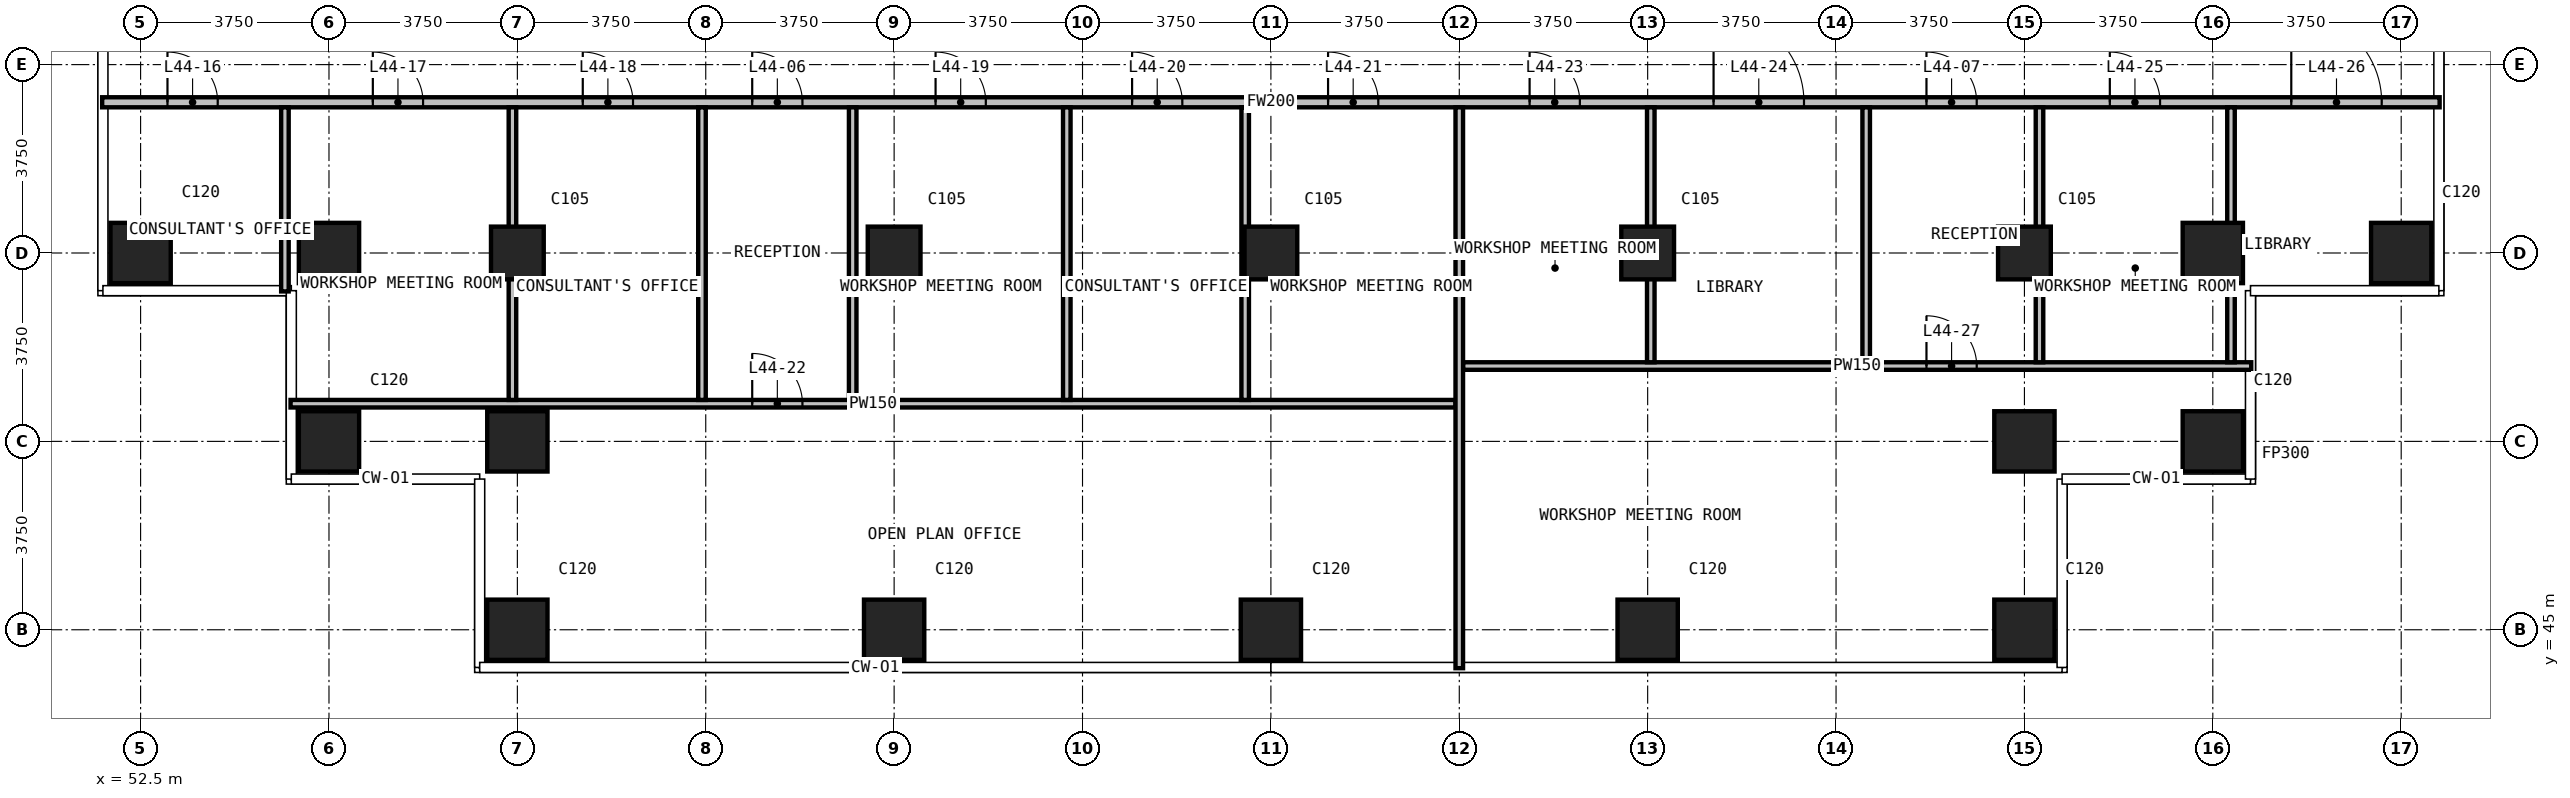
"""IFC4 building model, lengths in metres.
Left out: names, types, materials, properties, quantities, classifications, styles, units other than length and angle.
Written with IfcOpenShell. Run it as: python <this file> out.ifc"""

import sys

from ifc_helpers import new_model, si_unit, direction, frame, frame_2d, origin, origin_2d, place, context, subcontext, project, spatial, rectangle, extrude, element, fill, save


model = new_model("IFC4")
c1 = context("Model", 3, precision=1e-05, world=origin(), true_north=direction((0.0, 1.0)))
c2 = subcontext(c1, "Body", "Model", "MODEL_VIEW")
j1 = project(units=[si_unit("LENGTHUNIT", "METRE"), si_unit("PLANEANGLEUNIT", "RADIAN")], contexts=[c1])
p1 = place(None, origin())
s1 = spatial("IfcSite", under=j1, at=p1, CompositionType="ELEMENT")
p2 = place(p1, origin())
s2 = spatial("IfcBuilding", under=s1, at=p2, CompositionType="ELEMENT")
p3 = place(p2, frame((0.0, 0.0, 172.9)))
s3 = spatial("IfcBuildingStorey", under=s2, at=p3, CompositionType="ELEMENT", Elevation=172.9)
for number, where, z_axis, x_axis in (
    (1, (52.5, 52.5, 0.0), (0.0, 0.0, 1.0), (1.0, 0.0, 0.0)),
    (2, (56.25, 48.75, 0.0), (0.0, 0.0, 1.0), (1.0, 0.0, 0.0)),
    (3, (56.25, 52.5, 0.0), (0.0, 0.0, 1.0), (1.0, 0.0, 0.0)),
    (4, (60.0, 45.0, 0.0), (0.0, 0.0, 1.0), (1.0, 0.0, 0.0)),
    (5, (60.0, 48.75, 0.0), (0.0, 0.0, 1.0), (1.0, 0.0, 0.0)),
):
    element("IfcColumn", number, at=place(p3, frame(where, z_axis=z_axis, x_axis=x_axis)), inside=s3, PredefinedType="COLUMN", context=c2, shape_type="SweptSolid", body=[
        extrude(rectangle(XDim=1.2, YDim=1.2, at=origin_2d()), origin(), (0.0, 0.0, 1.0), 3.6),
    ])
p4 = place(p3, frame((60.0, 52.5, 0.0), z_axis=(0.0, 0.0, 1.0), x_axis=(1.0, 0.0, 0.0)))
e6 = element("IfcColumn", 6, at=p4, inside=s3, PredefinedType="COLUMN", context=c2, shape_type="SweptSolid", body=[
    extrude(rectangle(XDim=1.05, YDim=1.05, at=origin_2d()), origin(), (0.0, 0.0, 1.0), 3.6),
])
p5 = place(p3, frame((67.5, 45.0, 0.0), z_axis=(0.0, 0.0, 1.0), x_axis=(1.0, 0.0, 0.0)))
e7 = element("IfcColumn", 7, at=p5, inside=s3, PredefinedType="COLUMN", context=c2, shape_type="SweptSolid", body=[
    extrude(rectangle(XDim=1.2, YDim=1.2, at=origin_2d()), origin(), (0.0, 0.0, 1.0), 3.6),
])
p6 = place(p3, frame((67.5, 52.5, 0.0), z_axis=(0.0, 0.0, 1.0), x_axis=(1.0, 0.0, 0.0)))
e8 = element("IfcColumn", 8, at=p6, inside=s3, PredefinedType="COLUMN", context=c2, shape_type="SweptSolid", body=[
    extrude(rectangle(XDim=1.05, YDim=1.05, at=origin_2d()), origin(), (0.0, 0.0, 1.0), 3.6),
])
p7 = place(p3, frame((75.0, 45.0, 0.0), z_axis=(0.0, 0.0, 1.0), x_axis=(1.0, 0.0, 0.0)))
e9 = element("IfcColumn", 9, at=p7, inside=s3, PredefinedType="COLUMN", context=c2, shape_type="SweptSolid", body=[
    extrude(rectangle(XDim=1.2, YDim=1.2, at=origin_2d()), origin(), (0.0, 0.0, 1.0), 3.6),
])
p8 = place(p3, frame((75.0, 52.5, 0.0), z_axis=(0.0, 0.0, 1.0), x_axis=(1.0, 0.0, 0.0)))
e10 = element("IfcColumn", 10, at=p8, inside=s3, PredefinedType="COLUMN", context=c2, shape_type="SweptSolid", body=[
    extrude(rectangle(XDim=1.05, YDim=1.05, at=origin_2d()), origin(), (0.0, 0.0, 1.0), 3.6),
])
p9 = place(p3, frame((82.5, 45.0, 0.0), z_axis=(0.0, 0.0, 1.0), x_axis=(1.0, 0.0, 0.0)))
e11 = element("IfcColumn", 11, at=p9, inside=s3, PredefinedType="COLUMN", context=c2, shape_type="SweptSolid", body=[
    extrude(rectangle(XDim=1.2, YDim=1.2, at=origin_2d()), origin(), (0.0, 0.0, 1.0), 3.6),
])
p10 = place(p3, frame((82.5, 52.5, 0.0), z_axis=(0.0, 0.0, 1.0), x_axis=(1.0, 0.0, 0.0)))
e12 = element("IfcColumn", 12, at=p10, inside=s3, PredefinedType="COLUMN", context=c2, shape_type="SweptSolid", body=[
    extrude(rectangle(XDim=1.05, YDim=1.05, at=origin_2d()), origin(), (0.0, 0.0, 1.0), 3.6),
])
for number, where, z_axis, x_axis in (
    (13, (90.0, 45.0, 0.0), (0.0, 0.0, 1.0), (1.0, 0.0, 0.0)),
    (14, (90.0, 48.75, 0.0), (0.0, 0.0, 1.0), (1.0, 0.0, 0.0)),
):
    element("IfcColumn", number, at=place(p3, frame(where, z_axis=z_axis, x_axis=x_axis)), inside=s3, PredefinedType="COLUMN", context=c2, shape_type="SweptSolid", body=[
        extrude(rectangle(XDim=1.2, YDim=1.2, at=origin_2d()), origin(), (0.0, 0.0, 1.0), 3.6),
    ])
p11 = place(p3, frame((90.0, 52.5, 0.0), z_axis=(0.0, 0.0, 1.0), x_axis=(1.0, 0.0, 0.0)))
e15 = element("IfcColumn", 15, at=p11, inside=s3, PredefinedType="COLUMN", context=c2, shape_type="SweptSolid", body=[
    extrude(rectangle(XDim=1.05, YDim=1.05, at=origin_2d()), origin(), (0.0, 0.0, 1.0), 3.6),
])
for number, where, z_axis, x_axis in (
    (16, (93.75, 48.75, 0.0), (0.0, 0.0, 1.0), (1.0, 0.0, 0.0)),
    (17, (93.75, 52.5, 0.0), (0.0, 0.0, 1.0), (1.0, 0.0, 0.0)),
    (18, (97.5, 52.5, 0.0), (0.0, 0.0, 1.0), (1.0, 0.0, 0.0)),
):
    element("IfcColumn", number, at=place(p3, frame(where, z_axis=z_axis, x_axis=x_axis)), inside=s3, PredefinedType="COLUMN", context=c2, shape_type="SweptSolid", body=[
        extrude(rectangle(XDim=1.2, YDim=1.2, at=origin_2d()), origin(), (0.0, 0.0, 1.0), 3.6),
    ])
p12 = place(p3, frame((51.735, 55.5, 0.0), z_axis=(0.0, 0.0, 1.0), x_axis=(1.0, 0.0, 0.0)))
e19 = element("IfcWall", 19, at=p12, inside=s3, PredefinedType="PARTITIONING", context=c2, shape_type="SweptSolid", body=[
    extrude(rectangle(XDim=46.53, YDim=0.2, at=frame_2d((23.265, 0.0))), origin(), (0.0, 0.0, 1.0), 3.3),
])
p13 = place(p12, frame((12.94, 0.0, 0.0)))
e20 = element("IfcOpeningElement", 20, at=p13, cuts=e19, PredefinedType="OPENING", context=c2, shape_type="SweptSolid", body=[
    extrude(rectangle(XDim=1.0, YDim=2.2, at=frame_2d((0.5, 1.1))), frame((0.0, 0.11, 0.0), z_axis=(0.0, -1.0, 0.0), x_axis=(1.0, 0.0, 0.0)), (0.0, 0.0, 1.0), 0.22),
])
p14 = place(p12, frame((36.315, 0.0, 0.0)))
e21 = element("IfcOpeningElement", 21, at=p14, cuts=e19, PredefinedType="OPENING", context=c2, shape_type="SweptSolid", body=[
    extrude(rectangle(XDim=1.0, YDim=2.2, at=frame_2d((0.5, 1.1))), frame((0.0, 0.11, 0.0), z_axis=(0.0, -1.0, 0.0), x_axis=(1.0, 0.0, 0.0)), (0.0, 0.0, 1.0), 0.22),
])
p15 = place(p12, frame((1.3, 0.0, 0.0)))
e22 = element("IfcOpeningElement", 22, at=p15, cuts=e19, PredefinedType="OPENING", context=c2, shape_type="SweptSolid", body=[
    extrude(rectangle(XDim=1.0, YDim=2.2, at=frame_2d((0.5, 1.1))), frame((0.0, 0.11, 0.0), z_axis=(0.0, -1.0, 0.0), x_axis=(1.0, 0.0, 0.0)), (0.0, 0.0, 1.0), 0.22),
])
p16 = place(p12, frame((5.388, 0.0, 0.0)))
e23 = element("IfcOpeningElement", 23, at=p16, cuts=e19, PredefinedType="OPENING", context=c2, shape_type="SweptSolid", body=[
    extrude(rectangle(XDim=1.0, YDim=2.2, at=frame_2d((0.5, 1.1))), frame((0.0, 0.11, 0.0), z_axis=(0.0, -1.0, 0.0), x_axis=(1.0, 0.0, 0.0)), (0.0, 0.0, 1.0), 0.22),
])
p17 = place(p12, frame((9.567, 0.0, 0.0)))
e24 = element("IfcOpeningElement", 24, at=p17, cuts=e19, PredefinedType="OPENING", context=c2, shape_type="SweptSolid", body=[
    extrude(rectangle(XDim=1.0, YDim=2.2, at=frame_2d((0.5, 1.1))), frame((0.0, 0.11, 0.0), z_axis=(0.0, -1.0, 0.0), x_axis=(1.0, 0.0, 0.0)), (0.0, 0.0, 1.0), 0.22),
])
p18 = place(p12, frame((16.59, 0.0, 0.0)))
e25 = element("IfcOpeningElement", 25, at=p18, cuts=e19, PredefinedType="OPENING", context=c2, shape_type="SweptSolid", body=[
    extrude(rectangle(XDim=1.0, YDim=2.2, at=frame_2d((0.5, 1.1))), frame((0.0, 0.11, 0.0), z_axis=(0.0, -1.0, 0.0), x_axis=(1.0, 0.0, 0.0)), (0.0, 0.0, 1.0), 0.22),
])
p19 = place(p12, frame((20.502, 0.0, 0.0)))
e26 = element("IfcOpeningElement", 26, at=p19, cuts=e19, PredefinedType="OPENING", context=c2, shape_type="SweptSolid", body=[
    extrude(rectangle(XDim=1.0, YDim=2.2, at=frame_2d((0.5, 1.1))), frame((0.0, 0.11, 0.0), z_axis=(0.0, -1.0, 0.0), x_axis=(1.0, 0.0, 0.0)), (0.0, 0.0, 1.0), 0.22),
])
p20 = place(p12, frame((24.403, 0.0, 0.0)))
e27 = element("IfcOpeningElement", 27, at=p20, cuts=e19, PredefinedType="OPENING", context=c2, shape_type="SweptSolid", body=[
    extrude(rectangle(XDim=1.0, YDim=2.2, at=frame_2d((0.5, 1.1))), frame((0.0, 0.11, 0.0), z_axis=(0.0, -1.0, 0.0), x_axis=(1.0, 0.0, 0.0)), (0.0, 0.0, 1.0), 0.22),
])
p21 = place(p12, frame((28.415, 0.0, 0.0)))
e28 = element("IfcOpeningElement", 28, at=p21, cuts=e19, PredefinedType="OPENING", context=c2, shape_type="SweptSolid", body=[
    extrude(rectangle(XDim=1.0, YDim=2.2, at=frame_2d((0.5, 1.1))), frame((0.0, 0.11, 0.0), z_axis=(0.0, -1.0, 0.0), x_axis=(1.0, 0.0, 0.0)), (0.0, 0.0, 1.0), 0.22),
])
p22 = place(p12, frame((32.077, 0.0, 0.0)))
e29 = element("IfcOpeningElement", 29, at=p22, cuts=e19, PredefinedType="OPENING", context=c2, shape_type="SweptSolid", body=[
    extrude(rectangle(XDim=1.8, YDim=2.2, at=frame_2d((0.9, 1.1))), frame((0.0, 0.11, 0.0), z_axis=(0.0, -1.0, 0.0), x_axis=(1.0, 0.0, 0.0)), (0.0, 0.0, 1.0), 0.22),
])
p23 = place(p12, frame((39.965, 0.0, 0.0)))
e30 = element("IfcOpeningElement", 30, at=p23, cuts=e19, PredefinedType="OPENING", context=c2, shape_type="SweptSolid", body=[
    extrude(rectangle(XDim=1.0, YDim=2.2, at=frame_2d((0.5, 1.1))), frame((0.0, 0.11, 0.0), z_axis=(0.0, -1.0, 0.0), x_axis=(1.0, 0.0, 0.0)), (0.0, 0.0, 1.0), 0.22),
])
p24 = place(p12, frame((43.577, 0.0, 0.0)))
e31 = element("IfcOpeningElement", 31, at=p24, cuts=e19, PredefinedType="OPENING", context=c2, shape_type="SweptSolid", body=[
    extrude(rectangle(XDim=1.8, YDim=2.2, at=frame_2d((0.9, 1.1))), frame((0.0, 0.11, 0.0), z_axis=(0.0, -1.0, 0.0), x_axis=(1.0, 0.0, 0.0)), (0.0, 0.0, 1.0), 0.22),
])
p25 = place(p3, frame((55.485, 49.5, 0.0), z_axis=(0.0, 0.0, 1.0), x_axis=(1.0, 0.0, 0.0)))
e32 = element("IfcWall", 32, at=p25, inside=s3, PredefinedType="PARTITIONING", context=c2, shape_type="SweptSolid", body=[
    extrude(rectangle(XDim=23.19, YDim=0.15, at=frame_2d((11.595, 0.0))), origin(), (0.0, 0.0, 1.0), 3.3),
])
p26 = place(p25, frame((9.19, 0.0, 0.0)))
e33 = element("IfcOpeningElement", 33, at=p26, cuts=e32, PredefinedType="OPENING", context=c2, shape_type="SweptSolid", body=[
    extrude(rectangle(XDim=1.0, YDim=2.2, at=frame_2d((0.5, 1.1))), frame((0.0, 0.085, 0.0), z_axis=(0.0, -1.0, 0.0), x_axis=(1.0, 0.0, 0.0)), (0.0, 0.0, 1.0), 0.17),
])
p27 = place(p3, frame((78.825, 50.25, 0.0), z_axis=(0.0, 0.0, 1.0), x_axis=(1.0, 0.0, 0.0)))
e34 = element("IfcWall", 34, at=p27, inside=s3, PredefinedType="PARTITIONING", context=c2, shape_type="SweptSolid", body=[
    extrude(rectangle(XDim=15.69, YDim=0.15, at=frame_2d((7.845, 0.0))), origin(), (0.0, 0.0, 1.0), 3.3),
])
p28 = place(p27, frame((9.225, 0.0, 0.0)))
e35 = element("IfcOpeningElement", 35, at=p28, cuts=e34, PredefinedType="OPENING", context=c2, shape_type="SweptSolid", body=[
    extrude(rectangle(XDim=1.0, YDim=2.2, at=frame_2d((0.5, 1.1))), frame((0.0, 0.085, 0.0), z_axis=(0.0, -1.0, 0.0), x_axis=(1.0, 0.0, 0.0)), (0.0, 0.0, 1.0), 0.17),
])
p29 = place(p3, frame((55.373, 51.735, 0.0), z_axis=(0.0, 0.0, 1.0), x_axis=(0.0, 1.0, 0.0)))
e36 = element("IfcWall", 36, at=p29, inside=s3, PredefinedType="PARTITIONING", context=c2, shape_type="SweptSolid", body=[
    extrude(rectangle(XDim=3.665, YDim=0.15, at=frame_2d((1.833, 0.0))), origin(), (0.0, 0.0, 1.0), 3.3),
])
for number, where, z_axis, x_axis in (
    (37, (59.902, 49.575, 0.0), (0.0, 0.0, 1.0), (0.0, 1.0, 0.0)),
    (38, (63.675, 49.575, 0.0), (0.0, 0.0, 1.0), (0.0, 1.0, 0.0)),
    (39, (66.675, 49.575, 0.0), (0.0, 0.0, 1.0), (0.0, 1.0, 0.0)),
    (40, (70.937, 49.575, 0.0), (0.0, 0.0, 1.0), (0.0, 1.0, 0.0)),
    (41, (74.488, 49.575, 0.0), (0.0, 0.0, 1.0), (0.0, 1.0, 0.0)),
):
    element("IfcWall", number, at=place(p3, frame(where, z_axis=z_axis, x_axis=x_axis)), inside=s3, PredefinedType="PARTITIONING", context=c2, shape_type="SweptSolid", body=[
        extrude(rectangle(XDim=5.825, YDim=0.15, at=frame_2d((2.913, 0.0))), origin(), (0.0, 0.0, 1.0), 3.3),
    ])
p30 = place(p3, frame((78.75, 44.235, 0.0), z_axis=(0.0, 0.0, 1.0), x_axis=(0.0, 1.0, 0.0)))
e42 = element("IfcWall", 42, at=p30, inside=s3, PredefinedType="PARTITIONING", context=c2, shape_type="SweptSolid", body=[
    extrude(rectangle(XDim=11.165, YDim=0.15, at=frame_2d((5.583, 0.0))), origin(), (0.0, 0.0, 1.0), 3.3),
])
for number, where, z_axis, x_axis in (
    (43, (82.562, 50.325, 0.0), (0.0, 0.0, 1.0), (0.0, 1.0, 0.0)),
    (44, (86.85, 50.325, 0.0), (0.0, 0.0, 1.0), (0.0, 1.0, 0.0)),
    (45, (90.3, 50.325, 0.0), (0.0, 0.0, 1.0), (0.0, 1.0, 0.0)),
    (46, (94.112, 50.325, 0.0), (0.0, 0.0, 1.0), (0.0, 1.0, 0.0)),
):
    element("IfcWall", number, at=place(p3, frame(where, z_axis=z_axis, x_axis=x_axis)), inside=s3, PredefinedType="PARTITIONING", context=c2, shape_type="SweptSolid", body=[
        extrude(rectangle(XDim=5.075, YDim=0.15, at=frame_2d((2.538, 0.0))), origin(), (0.0, 0.0, 1.0), 3.3),
    ])
p31 = place(p13, origin())
e47 = element("IfcDoor", 47, at=p31, inside=s3, OperationType="SINGLE_SWING_RIGHT", PredefinedType="DOOR", context=c2, shape_type="SweptSolid", body=[
    extrude(rectangle(XDim=1.0, YDim=2.2, at=frame_2d((0.5, 1.1))), frame((0.0, 0.025, 0.0), z_axis=(0.0, -1.0, 0.0), x_axis=(1.0, 0.0, 0.0)), (0.0, 0.0, 1.0), 0.05),
])
fill(e20, e47)
p32 = place(p14, origin())
e48 = element("IfcDoor", 48, at=p32, inside=s3, OperationType="SINGLE_SWING_RIGHT", PredefinedType="DOOR", context=c2, shape_type="SweptSolid", body=[
    extrude(rectangle(XDim=1.0, YDim=2.2, at=frame_2d((0.5, 1.1))), frame((0.0, 0.025, 0.0), z_axis=(0.0, -1.0, 0.0), x_axis=(1.0, 0.0, 0.0)), (0.0, 0.0, 1.0), 0.05),
])
fill(e21, e48)
p33 = place(p15, origin())
e49 = element("IfcDoor", 49, at=p33, inside=s3, OperationType="SINGLE_SWING_LEFT", PredefinedType="DOOR", context=c2, shape_type="SweptSolid", body=[
    extrude(rectangle(XDim=1.0, YDim=2.2, at=frame_2d((0.5, 1.1))), frame((0.0, 0.025, 0.0), z_axis=(0.0, -1.0, 0.0), x_axis=(1.0, 0.0, 0.0)), (0.0, 0.0, 1.0), 0.05),
])
fill(e22, e49)
p34 = place(p16, origin())
e50 = element("IfcDoor", 50, at=p34, inside=s3, OperationType="SINGLE_SWING_LEFT", PredefinedType="DOOR", context=c2, shape_type="SweptSolid", body=[
    extrude(rectangle(XDim=1.0, YDim=2.2, at=frame_2d((0.5, 1.1))), frame((0.0, 0.025, 0.0), z_axis=(0.0, -1.0, 0.0), x_axis=(1.0, 0.0, 0.0)), (0.0, 0.0, 1.0), 0.05),
])
fill(e23, e50)
p35 = place(p17, origin())
e51 = element("IfcDoor", 51, at=p35, inside=s3, OperationType="SINGLE_SWING_RIGHT", PredefinedType="DOOR", context=c2, shape_type="SweptSolid", body=[
    extrude(rectangle(XDim=1.0, YDim=2.2, at=frame_2d((0.5, 1.1))), frame((0.0, 0.025, 0.0), z_axis=(0.0, -1.0, 0.0), x_axis=(1.0, 0.0, 0.0)), (0.0, 0.0, 1.0), 0.05),
])
fill(e24, e51)
p36 = place(p18, origin())
e52 = element("IfcDoor", 52, at=p36, inside=s3, OperationType="SINGLE_SWING_LEFT", PredefinedType="DOOR", context=c2, shape_type="SweptSolid", body=[
    extrude(rectangle(XDim=1.0, YDim=2.2, at=frame_2d((0.5, 1.1))), frame((0.0, 0.025, 0.0), z_axis=(0.0, -1.0, 0.0), x_axis=(1.0, 0.0, 0.0)), (0.0, 0.0, 1.0), 0.05),
])
fill(e25, e52)
p37 = place(p19, origin())
e53 = element("IfcDoor", 53, at=p37, inside=s3, OperationType="SINGLE_SWING_RIGHT", PredefinedType="DOOR", context=c2, shape_type="SweptSolid", body=[
    extrude(rectangle(XDim=1.0, YDim=2.2, at=frame_2d((0.5, 1.1))), frame((0.0, 0.025, 0.0), z_axis=(0.0, -1.0, 0.0), x_axis=(1.0, 0.0, 0.0)), (0.0, 0.0, 1.0), 0.05),
])
fill(e26, e53)
p38 = place(p20, origin())
e54 = element("IfcDoor", 54, at=p38, inside=s3, OperationType="SINGLE_SWING_LEFT", PredefinedType="DOOR", context=c2, shape_type="SweptSolid", body=[
    extrude(rectangle(XDim=1.0, YDim=2.2, at=frame_2d((0.5, 1.1))), frame((0.0, 0.025, 0.0), z_axis=(0.0, -1.0, 0.0), x_axis=(1.0, 0.0, 0.0)), (0.0, 0.0, 1.0), 0.05),
])
fill(e27, e54)
p39 = place(p26, origin())
e55 = element("IfcDoor", 55, at=p39, inside=s3, OperationType="SINGLE_SWING_LEFT", PredefinedType="DOOR", context=c2, shape_type="SweptSolid", body=[
    extrude(rectangle(XDim=1.0, YDim=2.2, at=frame_2d((0.5, 1.1))), frame((0.0, 0.025, 0.0), z_axis=(0.0, -1.0, 0.0), x_axis=(1.0, 0.0, 0.0)), (0.0, 0.0, 1.0), 0.05),
])
fill(e33, e55)
p40 = place(p21, origin())
e56 = element("IfcDoor", 56, at=p40, inside=s3, OperationType="SINGLE_SWING_RIGHT", PredefinedType="DOOR", context=c2, shape_type="SweptSolid", body=[
    extrude(rectangle(XDim=1.0, YDim=2.2, at=frame_2d((0.5, 1.1))), frame((0.0, 0.025, 0.0), z_axis=(0.0, -1.0, 0.0), x_axis=(1.0, 0.0, 0.0)), (0.0, 0.0, 1.0), 0.05),
])
fill(e28, e56)
p41 = place(p22, origin())
e57 = element("IfcDoor", 57, at=p41, inside=s3, OperationType="DOUBLE_DOOR_SINGLE_SWING", PredefinedType="DOOR", context=c2, shape_type="SweptSolid", body=[
    extrude(rectangle(XDim=1.8, YDim=2.2, at=frame_2d((0.9, 1.1))), frame((0.0, 0.025, 0.0), z_axis=(0.0, -1.0, 0.0), x_axis=(1.0, 0.0, 0.0)), (0.0, 0.0, 1.0), 0.05),
])
fill(e29, e57)
p42 = place(p23, origin())
e58 = element("IfcDoor", 58, at=p42, inside=s3, OperationType="SINGLE_SWING_RIGHT", PredefinedType="DOOR", context=c2, shape_type="SweptSolid", body=[
    extrude(rectangle(XDim=1.0, YDim=2.2, at=frame_2d((0.5, 1.1))), frame((0.0, 0.025, 0.0), z_axis=(0.0, -1.0, 0.0), x_axis=(1.0, 0.0, 0.0)), (0.0, 0.0, 1.0), 0.05),
])
fill(e30, e58)
p43 = place(p24, origin())
e59 = element("IfcDoor", 59, at=p43, inside=s3, OperationType="DOUBLE_DOOR_SINGLE_SWING", PredefinedType="DOOR", context=c2, shape_type="SweptSolid", body=[
    extrude(rectangle(XDim=1.8, YDim=2.2, at=frame_2d((0.9, 1.1))), frame((0.0, 0.025, 0.0), z_axis=(0.0, -1.0, 0.0), x_axis=(1.0, 0.0, 0.0)), (0.0, 0.0, 1.0), 0.05),
])
fill(e31, e59)
p44 = place(p28, origin())
e60 = element("IfcDoor", 60, at=p44, inside=s3, OperationType="SINGLE_SWING_LEFT", PredefinedType="DOOR", context=c2, shape_type="SweptSolid", body=[
    extrude(rectangle(XDim=1.0, YDim=2.2, at=frame_2d((0.5, 1.1))), frame((0.0, 0.025, 0.0), z_axis=(0.0, -1.0, 0.0), x_axis=(1.0, 0.0, 0.0)), (0.0, 0.0, 1.0), 0.05),
])
fill(e35, e60)
save(model, sys.argv[1])
